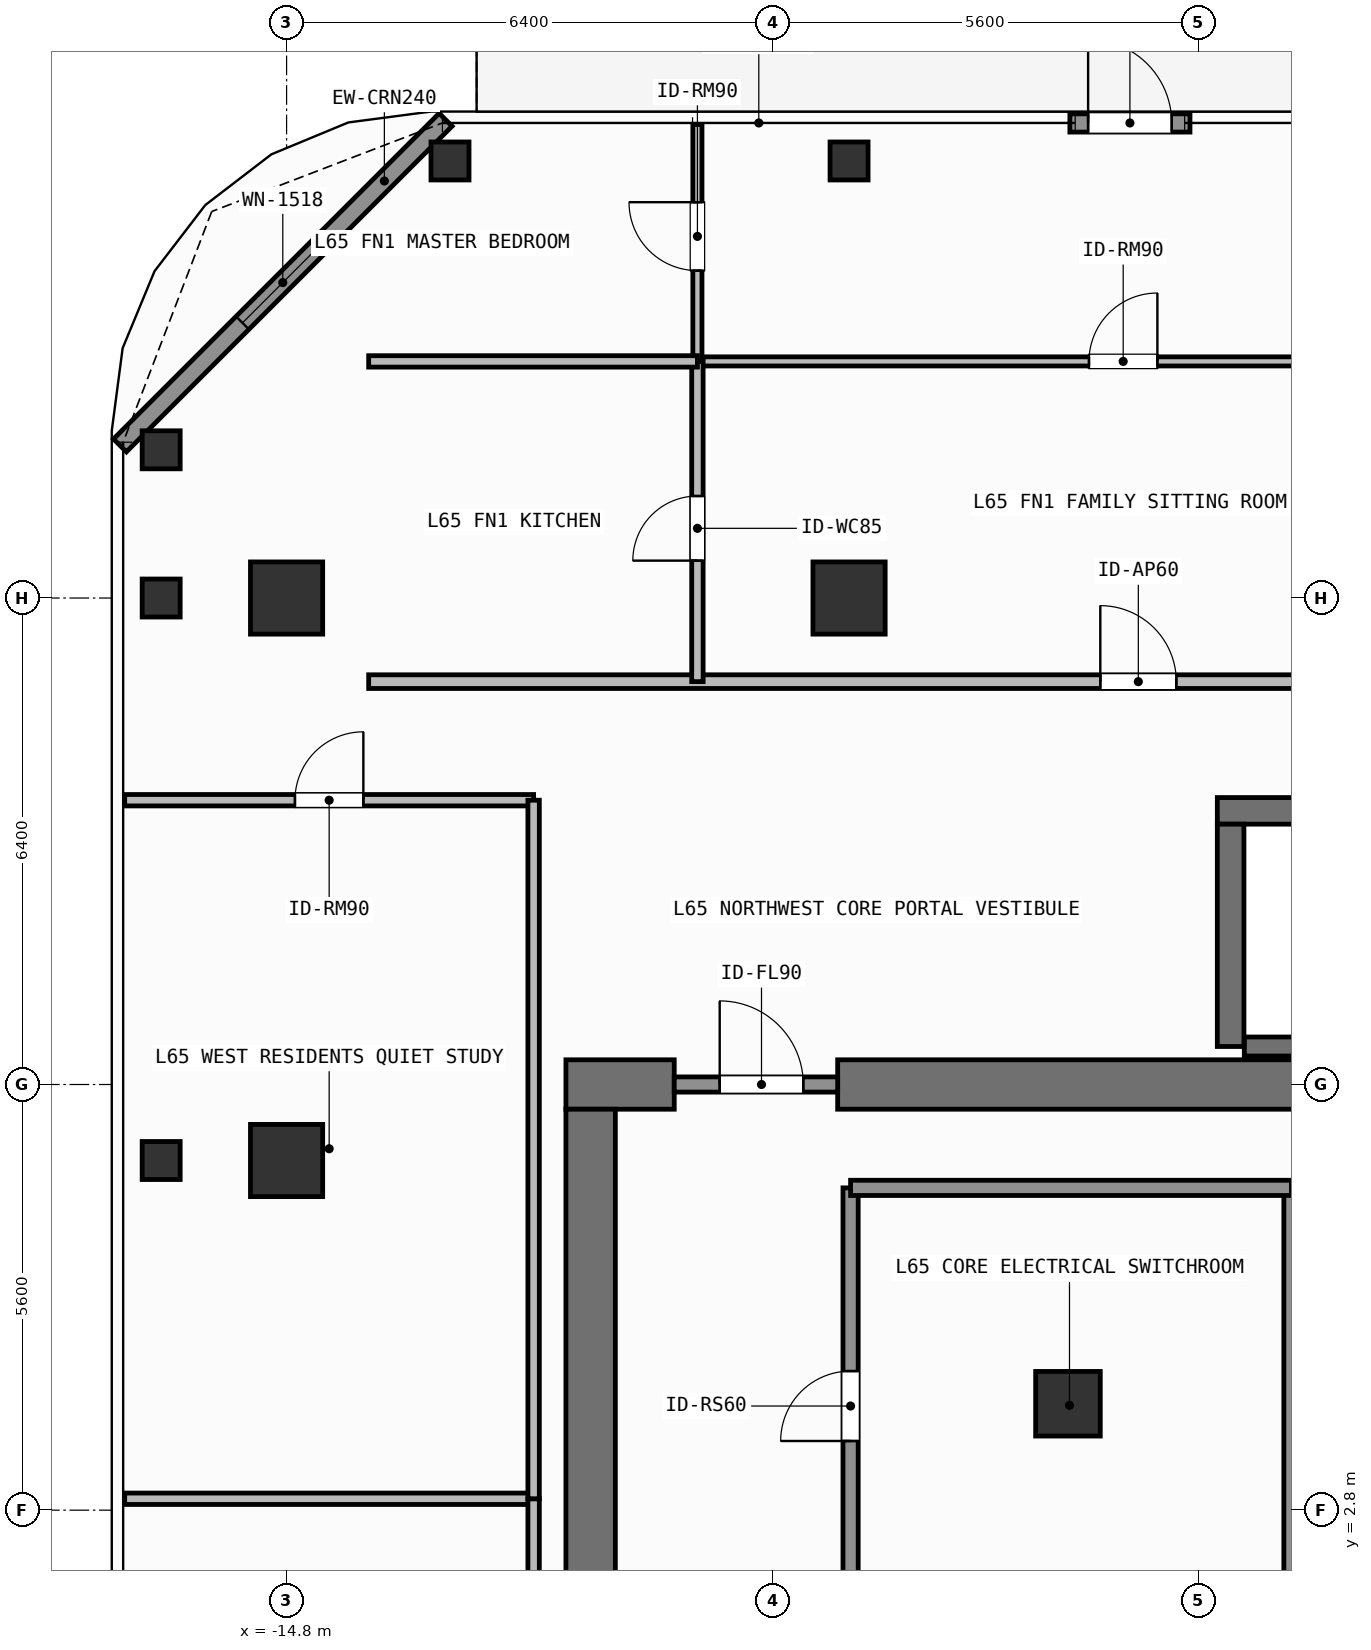
"""IFC4 building model, lengths in metres.
Left out: names, types, materials, properties, quantities, classifications, styles, units other than length and angle.
Written with IfcOpenShell. Run it as: python <this file> out.ifc"""

import sys

from ifc_helpers import new_model, si_unit, direction, frame, frame_2d, origin, origin_2d, place, context, subcontext, project, spatial, rectangle, hollow_rectangle, extrude, element, fill, save


model = new_model("IFC4")
c1 = context("Model", 3, precision=1e-05, world=origin(), true_north=direction((0.0, 1.0)))
c2 = subcontext(c1, "Body", "Model", "MODEL_VIEW")
j1 = project(units=[si_unit("LENGTHUNIT", "METRE"), si_unit("PLANEANGLEUNIT", "RADIAN")], contexts=[c1])
p1 = place(None, origin())
s1 = spatial("IfcSite", under=j1, at=p1, CompositionType="ELEMENT")
p2 = place(p1, origin())
s2 = spatial("IfcBuilding", under=s1, at=p2, CompositionType="ELEMENT")
p3 = place(p2, frame((0.0, 0.0, 266.4)))
s3 = spatial("IfcBuildingStorey", under=s2, at=p3, CompositionType="ELEMENT", Elevation=266.4)
p4 = place(p3, frame((-11.125, 8.4, 0.0), z_axis=(0.0, 0.0, 1.0), x_axis=(1.0, 0.0, 0.0)))
e1 = element("IfcWall", 1, at=p4, inside=s3, PredefinedType="SHEAR", context=c2, shape_type="SweptSolid", body=[
    extrude(rectangle(XDim=1.425, YDim=0.65, at=frame_2d((0.712, 0.0))), origin(), (0.0, 0.0, 1.0), 3.9),
])
p5 = place(p3, frame((-7.55, 8.4, 0.0), z_axis=(0.0, 0.0, 1.0), x_axis=(1.0, 0.0, 0.0)))
e2 = element("IfcWall", 2, at=p5, inside=s3, PredefinedType="SHEAR", context=c2, shape_type="SweptSolid", body=[
    extrude(rectangle(XDim=16.275, YDim=0.65, at=frame_2d((8.138, 0.0))), origin(), (0.0, 0.0, 1.0), 3.9),
])
p6 = place(p3, frame((-10.8, -8.075, 0.0), z_axis=(0.0, 0.0, 1.0), x_axis=(0.0, 1.0, 0.0)))
e3 = element("IfcWall", 3, at=p6, inside=s3, PredefinedType="SHEAR", context=c2, shape_type="SweptSolid", body=[
    extrude(rectangle(XDim=16.15, YDim=0.65, at=frame_2d((8.075, 0.0))), origin(), (0.0, 0.0, 1.0), 3.9),
])
p7 = place(p3, frame((-2.555, 12.0, 0.0), z_axis=(0.0, 0.0, 1.0), x_axis=(1.0, 0.0, 0.0)))
e4 = element("IfcWall", 4, at=p7, inside=s3, PredefinedType="SHEAR", context=c2, shape_type="SweptSolid", body=[
    extrude(rectangle(XDim=7.31, YDim=0.35, at=frame_2d((3.655, 0.0))), origin(), (0.0, 0.0, 1.0), 3.9),
])
p8 = place(p3, frame((-2.2, 8.9, 0.0), z_axis=(0.0, 0.0, 1.0), x_axis=(1.0, 0.0, 0.0)))
e5 = element("IfcWall", 5, at=p8, inside=s3, PredefinedType="SHEAR", context=c2, shape_type="SweptSolid", body=[
    extrude(rectangle(XDim=6.6, YDim=0.25, at=frame_2d((3.3, 0.0))), origin(), (0.0, 0.0, 1.0), 3.9),
])
p9 = place(p3, frame((-2.38, 8.9, 0.0), z_axis=(0.0, 0.0, 1.0), x_axis=(0.0, 1.0, 0.0)))
e6 = element("IfcWall", 6, at=p9, inside=s3, PredefinedType="SHEAR", context=c2, shape_type="SweptSolid", body=[
    extrude(rectangle(XDim=2.925, YDim=0.35, at=frame_2d((1.462, 0.0))), origin(), (0.0, 0.0, 1.0), 3.9),
])
for number, where, z_axis, x_axis in (
    (7, (-14.8, 14.8, 0.0), (0.0, 0.0, 1.0), (1.0, 0.0, 0.0)),
    (8, (-7.4, 14.8, 0.0), (0.0, 0.0, 1.0), (1.0, 0.0, 0.0)),
    (9, (-14.8, 7.4, 0.0), (0.0, 0.0, 1.0), (1.0, 0.0, 0.0)),
):
    element("IfcColumn", number, at=place(p3, frame(where, z_axis=z_axis, x_axis=x_axis)), inside=s3, PredefinedType="COLUMN", context=c2, shape_type="SweptSolid", body=[
        extrude(rectangle(XDim=0.95, YDim=0.95, at=origin_2d()), origin(), (0.0, 0.0, 1.0), 3.9),
    ])
p10 = place(p3, frame((-4.52, 4.2, 0.0), z_axis=(0.0, 0.0, 1.0), x_axis=(1.0, 0.0, 0.0)))
e10 = element("IfcColumn", 10, at=p10, inside=s3, PredefinedType="COLUMN", context=c2, shape_type="SweptSolid", body=[
    extrude(rectangle(XDim=0.85, YDim=0.85, at=origin_2d()), origin(), (0.0, 0.0, 1.0), 3.9),
])
for number, where, z_axis, x_axis in (
    (11, (-12.65, 20.55, 0.0), (0.0, 0.0, 1.0), (1.0, 0.0, 0.0)),
    (12, (-16.45, 16.75, 0.0), (0.0, 0.0, 1.0), (1.0, 0.0, 0.0)),
    (13, (-7.4, 20.55, 0.0), (0.0, 0.0, 1.0), (1.0, 0.0, 0.0)),
    (14, (-16.45, 7.4, 0.0), (0.0, 0.0, 1.0), (1.0, 0.0, 0.0)),
    (15, (-16.45, 14.8, 0.0), (0.0, 0.0, 1.0), (1.0, 0.0, 0.0)),
):
    element("IfcColumn", number, at=place(p3, frame(where, z_axis=z_axis, x_axis=x_axis)), inside=s3, PredefinedType="COLUMN", context=c2, shape_type="SweptSolid", body=[
        extrude(hollow_rectangle(XDim=0.5, YDim=0.5, WallThickness=0.025, at=origin_2d()), origin(), (0.0, 0.0, 1.0), 3.9),
    ])
p11 = place(p3, frame((-4.495, 21.05, 0.0), z_axis=(0.0, 0.0, 1.0), x_axis=(1.0, 0.0, 0.0)))
e16 = element("IfcWall", 16, at=p11, inside=s3, PredefinedType="SOLIDWALL", context=c2, shape_type="SweptSolid", body=[
    extrude(rectangle(XDim=1.58, YDim=0.24, at=frame_2d((0.79, 0.0))), origin(), (0.0, 0.0, 1.0), 3.68),
])
p12 = place(p11, frame((0.24, 0.0, 0.0)))
e17 = element("IfcOpeningElement", 17, at=p12, cuts=e16, PredefinedType="OPENING", context=c2, shape_type="SweptSolid", body=[
    extrude(rectangle(XDim=1.1, YDim=2.2, at=frame_2d((0.55, 1.1))), frame((0.0, 0.13, 0.0), z_axis=(0.0, -1.0, 0.0), x_axis=(1.0, 0.0, 0.0)), (0.0, 0.0, 1.0), 0.26),
])
p13 = place(p3, frame((-16.992, 16.808, 0.0), z_axis=(0.0, 0.0, 1.0), x_axis=(0.707126925818, 0.707086635981, 0.0)))
e18 = element("IfcWall", 18, at=p13, inside=s3, PredefinedType="SOLIDWALL", context=c2, shape_type="SweptSolid", body=[
    extrude(rectangle(XDim=6.06, YDim=0.24, at=frame_2d((3.03, 0.0))), origin(), (0.0, 0.0, 1.0), 3.68),
])
p14 = place(p13, frame((2.28, 0.0, 0.8)))
e19 = element("IfcOpeningElement", 19, at=p14, cuts=e18, PredefinedType="OPENING", context=c2, shape_type="SweptSolid", body=[
    extrude(rectangle(XDim=1.5, YDim=1.85, at=frame_2d((0.75, 0.925))), frame((0.0, 0.13, 0.0), z_axis=(0.0, -1.0, 0.0), x_axis=(1.0, 0.0, 0.0)), (0.0, 0.0, 1.0), 0.26),
])
p15 = place(p3, frame((-9.7, 8.4, 0.0), z_axis=(0.0, 0.0, 1.0), x_axis=(1.0, 0.0, 0.0)))
e20 = element("IfcWall", 20, at=p15, inside=s3, PredefinedType="SOLIDWALL", context=c2, shape_type="SweptSolid", body=[
    extrude(rectangle(XDim=2.15, YDim=0.2, at=frame_2d((1.075, 0.0))), origin(), (0.0, 0.0, 1.0), 2.92),
])
p16 = place(p15, frame((0.598, 0.0, 0.0)))
e21 = element("IfcOpeningElement", 21, at=p16, cuts=e20, PredefinedType="OPENING", context=c2, shape_type="SweptSolid", body=[
    extrude(rectangle(XDim=1.1, YDim=2.15, at=frame_2d((0.55, 1.075))), frame((0.0, 0.11, 0.0), z_axis=(0.0, -1.0, 0.0), x_axis=(1.0, 0.0, 0.0)), (0.0, 0.0, 1.0), 0.22),
])
p17 = place(p3, frame((-7.38, 1.3, 0.0), z_axis=(0.0, 0.0, 1.0), x_axis=(0.0, 1.0, 0.0)))
e22 = element("IfcWall", 22, at=p17, inside=s3, PredefinedType="SOLIDWALL", context=c2, shape_type="SweptSolid", body=[
    extrude(rectangle(XDim=5.74, YDim=0.2, at=frame_2d((2.87, 0.0))), origin(), (0.0, 0.0, 1.0), 3.68),
])
p18 = place(p17, frame((2.41, 0.0, 0.0)))
e23 = element("IfcOpeningElement", 23, at=p18, cuts=e22, PredefinedType="OPENING", context=c2, shape_type="SweptSolid", body=[
    extrude(rectangle(XDim=0.92, YDim=2.1, at=frame_2d((0.46, 1.05))), frame((0.0, 0.11, 0.0), z_axis=(0.0, -1.0, 0.0), x_axis=(1.0, 0.0, 0.0)), (0.0, 0.0, 1.0), 0.22),
])
p19 = place(p3, frame((-13.72, 13.7, 0.0), z_axis=(0.0, 0.0, 1.0), x_axis=(1.0, 0.0, 0.0)))
e24 = element("IfcWall", 24, at=p19, inside=s3, PredefinedType="PARTITIONING", context=c2, shape_type="SweptSolid", body=[
    extrude(rectangle(XDim=21.144, YDim=0.18, at=frame_2d((10.572, 0.0))), origin(), (0.0, 0.0, 1.0), 3.68),
])
p20 = place(p19, frame((9.625, 0.0, 0.0)))
e25 = element("IfcOpeningElement", 25, at=p20, cuts=e24, PredefinedType="OPENING", context=c2, shape_type="SweptSolid", body=[
    extrude(rectangle(XDim=1.0, YDim=2.2, at=frame_2d((0.5, 1.1))), frame((0.0, 0.1, 0.0), z_axis=(0.0, -1.0, 0.0), x_axis=(1.0, 0.0, 0.0)), (0.0, 0.0, 1.0), 0.2),
])
p21 = place(p3, frame((-9.395, 17.913, 0.0), z_axis=(0.0, 0.0, 1.0), x_axis=(1.0, 0.0, 0.0)))
e26 = element("IfcWall", 26, at=p21, inside=s3, PredefinedType="PARTITIONING", context=c2, shape_type="SweptSolid", body=[
    extrude(rectangle(XDim=11.381, YDim=0.12, at=frame_2d((5.69, 0.0))), origin(), (0.0, 0.0, 1.0), 3.68),
])
p22 = place(p21, frame((5.151, 0.0, 0.0)))
e27 = element("IfcOpeningElement", 27, at=p22, cuts=e26, PredefinedType="OPENING", context=c2, shape_type="SweptSolid", body=[
    extrude(rectangle(XDim=0.9, YDim=2.1, at=frame_2d((0.45, 1.05))), frame((0.0, 0.07, 0.0), z_axis=(0.0, -1.0, 0.0), x_axis=(1.0, 0.0, 0.0)), (0.0, 0.0, 1.0), 0.14),
])
p23 = place(p3, frame((-9.395, 13.7, 0.0), z_axis=(0.0, 0.0, 1.0), x_axis=(0.0, 1.0, 0.0)))
e28 = element("IfcWall", 28, at=p23, inside=s3, PredefinedType="PARTITIONING", context=c2, shape_type="SweptSolid", body=[
    extrude(rectangle(XDim=4.213, YDim=0.15, at=frame_2d((2.106, 0.0))), origin(), (0.0, 0.0, 1.0), 3.68),
])
p24 = place(p23, frame((1.592, 0.0, 0.0)))
e29 = element("IfcOpeningElement", 29, at=p24, cuts=e28, PredefinedType="OPENING", context=c2, shape_type="SweptSolid", body=[
    extrude(rectangle(XDim=0.85, YDim=2.1, at=frame_2d((0.425, 1.05))), frame((0.0, 0.085, 0.0), z_axis=(0.0, -1.0, 0.0), x_axis=(1.0, 0.0, 0.0)), (0.0, 0.0, 1.0), 0.17),
])
p25 = place(p3, frame((-9.395, 17.913, 0.0), z_axis=(0.0, 0.0, 1.0), x_axis=(0.0, 1.0, 0.0)))
e30 = element("IfcWall", 30, at=p25, inside=s3, PredefinedType="PARTITIONING", context=c2, shape_type="SweptSolid", body=[
    extrude(rectangle(XDim=3.117, YDim=0.12, at=frame_2d((1.559, 0.0))), origin(), (0.0, 0.0, 1.0), 3.68),
])
p26 = place(p25, frame((1.195, 0.0, 0.0)))
e31 = element("IfcOpeningElement", 31, at=p26, cuts=e30, PredefinedType="OPENING", context=c2, shape_type="SweptSolid", body=[
    extrude(rectangle(XDim=0.9, YDim=2.1, at=frame_2d((0.45, 1.05))), frame((0.0, 0.07, 0.0), z_axis=(0.0, -1.0, 0.0), x_axis=(1.0, 0.0, 0.0)), (0.0, 0.0, 1.0), 0.14),
])
p27 = place(p3, frame((-16.93, 12.14, 0.0), z_axis=(0.0, 0.0, 1.0), x_axis=(1.0, 0.0, 0.0)))
e32 = element("IfcWall", 32, at=p27, inside=s3, PredefinedType="PARTITIONING", context=c2, shape_type="SweptSolid", body=[
    extrude(rectangle(XDim=5.38, YDim=0.15, at=frame_2d((2.69, 0.0))), origin(), (0.0, 0.0, 1.0), 3.68),
])
p28 = place(p27, frame((2.24, 0.0, 0.0)))
e33 = element("IfcOpeningElement", 33, at=p28, cuts=e32, PredefinedType="OPENING", context=c2, shape_type="SweptSolid", body=[
    extrude(rectangle(XDim=0.9, YDim=2.1, at=frame_2d((0.45, 1.05))), frame((0.0, 0.085, 0.0), z_axis=(0.0, -1.0, 0.0), x_axis=(1.0, 0.0, 0.0)), (0.0, 0.0, 1.0), 0.17),
])
p29 = place(p3, frame((-1.58, 1.3, 0.0), z_axis=(0.0, 0.0, 1.0), x_axis=(0.0, 1.0, 0.0)))
e34 = element("IfcWall", 34, at=p29, inside=s3, PredefinedType="SOLIDWALL", context=c2, shape_type="SweptSolid", body=[
    extrude(rectangle(XDim=5.74, YDim=0.2, at=frame_2d((2.87, 0.0))), origin(), (0.0, 0.0, 1.0), 3.68),
])
p30 = place(p3, frame((-7.38, 7.04, 0.0), z_axis=(0.0, 0.0, 1.0), x_axis=(1.0, 0.0, 0.0)))
e35 = element("IfcWall", 35, at=p30, inside=s3, PredefinedType="SOLIDWALL", context=c2, shape_type="SweptSolid", body=[
    extrude(rectangle(XDim=5.8, YDim=0.2, at=frame_2d((2.9, 0.0))), origin(), (0.0, 0.0, 1.0), 3.68),
])
p31 = place(p3, frame((-13.72, 17.913, 0.0), z_axis=(0.0, 0.0, 1.0), x_axis=(1.0, 0.0, 0.0)))
e36 = element("IfcWall", 36, at=p31, inside=s3, PredefinedType="PARTITIONING", context=c2, shape_type="SweptSolid", body=[
    extrude(rectangle(XDim=4.325, YDim=0.15, at=frame_2d((2.163, 0.0))), origin(), (0.0, 0.0, 1.0), 3.68),
])
p32 = place(p3, frame((-16.93, 2.95, 0.0), z_axis=(0.0, 0.0, 1.0), x_axis=(1.0, 0.0, 0.0)))
e37 = element("IfcWall", 37, at=p32, inside=s3, PredefinedType="PARTITIONING", context=c2, shape_type="SweptSolid", body=[
    extrude(rectangle(XDim=5.38, YDim=0.15, at=frame_2d((2.69, 0.0))), origin(), (0.0, 0.0, 1.0), 3.68),
])
p33 = place(p3, frame((-11.55, -12.14, 0.0), z_axis=(0.0, 0.0, 1.0), x_axis=(0.0, 1.0, 0.0)))
e38 = element("IfcWall", 38, at=p33, inside=s3, PredefinedType="PARTITIONING", context=c2, shape_type="SweptSolid", body=[
    extrude(rectangle(XDim=15.09, YDim=0.15, at=frame_2d((7.545, 0.0))), origin(), (0.0, 0.0, 1.0), 3.68),
])
p34 = place(p3, frame((-11.55, 2.95, 0.0), z_axis=(0.0, 0.0, 1.0), x_axis=(0.0, 1.0, 0.0)))
e39 = element("IfcWall", 39, at=p34, inside=s3, PredefinedType="PARTITIONING", context=c2, shape_type="SweptSolid", body=[
    extrude(rectangle(XDim=9.19, YDim=0.15, at=frame_2d((4.595, 0.0))), origin(), (0.0, 0.0, 1.0), 3.68),
])
p35 = place(p12, origin())
e40 = element("IfcDoor", 40, at=p35, inside=s3, OperationType="SINGLE_SWING_LEFT", PredefinedType="DOOR", context=c2, shape_type="SweptSolid", body=[
    extrude(rectangle(XDim=1.1, YDim=2.2, at=frame_2d((0.55, 1.1))), frame((0.0, 0.025, 0.0), z_axis=(0.0, -1.0, 0.0), x_axis=(1.0, 0.0, 0.0)), (0.0, 0.0, 1.0), 0.05),
])
fill(e17, e40)
p36 = place(p14, origin())
e41 = element("IfcWindow", 41, at=p36, inside=s3, PartitioningType="SINGLE_PANEL", PredefinedType="WINDOW", context=c2, shape_type="SweptSolid", body=[
    extrude(rectangle(XDim=1.5, YDim=1.85, at=frame_2d((0.75, 0.925))), frame((0.0, 0.03, 0.0), z_axis=(0.0, -1.0, 0.0), x_axis=(1.0, 0.0, 0.0)), (0.0, 0.0, 1.0), 0.06),
])
fill(e19, e41)
p37 = place(p16, origin())
e42 = element("IfcDoor", 42, at=p37, inside=s3, OperationType="SINGLE_SWING_LEFT", PredefinedType="DOOR", context=c2, shape_type="SweptSolid", body=[
    extrude(rectangle(XDim=1.1, YDim=2.15, at=frame_2d((0.55, 1.075))), frame((0.0, 0.025, 0.0), z_axis=(0.0, -1.0, 0.0), x_axis=(1.0, 0.0, 0.0)), (0.0, 0.0, 1.0), 0.05),
])
fill(e21, e42)
p38 = place(p18, origin())
e43 = element("IfcDoor", 43, at=p38, inside=s3, OperationType="SINGLE_SWING_LEFT", PredefinedType="DOOR", context=c2, shape_type="SweptSolid", body=[
    extrude(rectangle(XDim=0.92, YDim=2.1, at=frame_2d((0.46, 1.05))), frame((0.0, 0.025, 0.0), z_axis=(0.0, -1.0, 0.0), x_axis=(1.0, 0.0, 0.0)), (0.0, 0.0, 1.0), 0.05),
])
fill(e23, e43)
p39 = place(p20, origin())
e44 = element("IfcDoor", 44, at=p39, inside=s3, OperationType="SINGLE_SWING_LEFT", PredefinedType="DOOR", context=c2, shape_type="SweptSolid", body=[
    extrude(rectangle(XDim=1.0, YDim=2.2, at=frame_2d((0.5, 1.1))), frame((0.0, 0.025, 0.0), z_axis=(0.0, -1.0, 0.0), x_axis=(1.0, 0.0, 0.0)), (0.0, 0.0, 1.0), 0.05),
])
fill(e25, e44)
p40 = place(p22, origin())
e45 = element("IfcDoor", 45, at=p40, inside=s3, OperationType="SINGLE_SWING_RIGHT", PredefinedType="DOOR", context=c2, shape_type="SweptSolid", body=[
    extrude(rectangle(XDim=0.9, YDim=2.1, at=frame_2d((0.45, 1.05))), frame((0.0, 0.025, 0.0), z_axis=(0.0, -1.0, 0.0), x_axis=(1.0, 0.0, 0.0)), (0.0, 0.0, 1.0), 0.05),
])
fill(e27, e45)
p41 = place(p24, origin())
e46 = element("IfcDoor", 46, at=p41, inside=s3, OperationType="SINGLE_SWING_LEFT", PredefinedType="DOOR", context=c2, shape_type="SweptSolid", body=[
    extrude(rectangle(XDim=0.85, YDim=2.1, at=frame_2d((0.425, 1.05))), frame((0.0, 0.025, 0.0), z_axis=(0.0, -1.0, 0.0), x_axis=(1.0, 0.0, 0.0)), (0.0, 0.0, 1.0), 0.05),
])
fill(e29, e46)
p42 = place(p26, origin())
e47 = element("IfcDoor", 47, at=p42, inside=s3, OperationType="SINGLE_SWING_RIGHT", PredefinedType="DOOR", context=c2, shape_type="SweptSolid", body=[
    extrude(rectangle(XDim=0.9, YDim=2.1, at=frame_2d((0.45, 1.05))), frame((0.0, 0.025, 0.0), z_axis=(0.0, -1.0, 0.0), x_axis=(1.0, 0.0, 0.0)), (0.0, 0.0, 1.0), 0.05),
])
fill(e31, e47)
p43 = place(p28, origin())
e48 = element("IfcDoor", 48, at=p43, inside=s3, OperationType="SINGLE_SWING_RIGHT", PredefinedType="DOOR", context=c2, shape_type="SweptSolid", body=[
    extrude(rectangle(XDim=0.9, YDim=2.1, at=frame_2d((0.45, 1.05))), frame((0.0, 0.025, 0.0), z_axis=(0.0, -1.0, 0.0), x_axis=(1.0, 0.0, 0.0)), (0.0, 0.0, 1.0), 0.05),
])
fill(e33, e48)
save(model, sys.argv[1])
